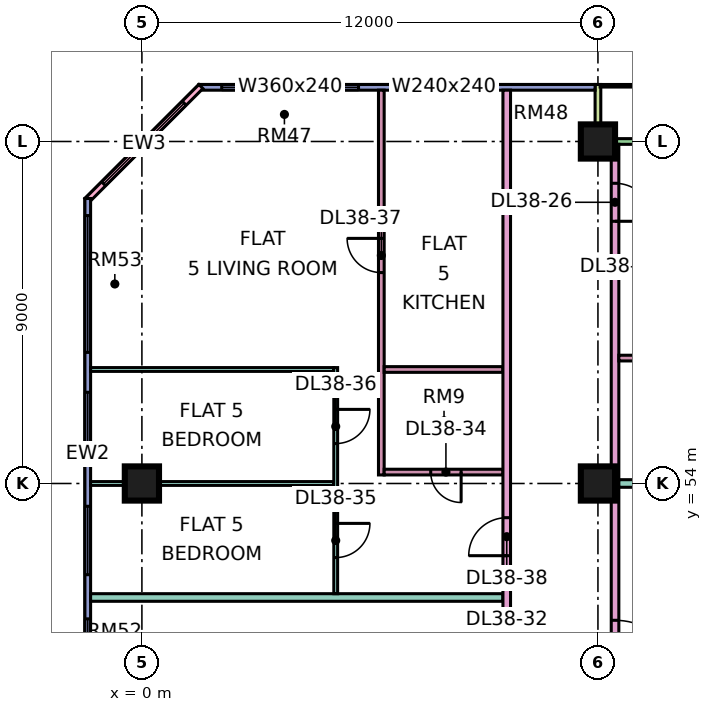
"""IFC4 building model, lengths in metres.
Left out: names, types, materials, properties, quantities, classifications, styles, units other than length and angle.
Written with IfcOpenShell. Run it as: python <this file> out.ifc"""

import sys

from ifc_helpers import new_model, si_unit, direction, frame, frame_2d, origin, origin_2d, place, context, subcontext, project, spatial, rectangle, extrude, element, fill, save


model = new_model("IFC4")
c1 = context("Model", 3, precision=1e-05, world=origin(), true_north=direction((0.0, 1.0)))
c2 = subcontext(c1, "Body", "Model", "MODEL_VIEW")
j1 = project(units=[si_unit("LENGTHUNIT", "METRE"), si_unit("PLANEANGLEUNIT", "RADIAN")], contexts=[c1])
p1 = place(None, origin())
s1 = spatial("IfcSite", under=j1, at=p1, CompositionType="ELEMENT")
p2 = place(p1, origin())
s2 = spatial("IfcBuilding", under=s1, at=p2, CompositionType="ELEMENT")
p3 = place(p2, frame((0.0, 0.0, 168.65)))
s3 = spatial("IfcBuildingStorey", under=s2, at=p3, CompositionType="ELEMENT", Elevation=168.65)
for number, where, z_axis, x_axis in (
    (1, (0.0, 54.0, 0.0), (0.0, 0.0, 1.0), (1.0, 0.0, 0.0)),
    (2, (12.0, 54.0, 0.0), (0.0, 0.0, 1.0), (1.0, 0.0, 0.0)),
    (3, (12.0, 63.0, 0.0), (0.0, 0.0, 1.0), (1.0, 0.0, 0.0)),
):
    element("IfcColumn", number, at=place(p3, frame(where, z_axis=z_axis, x_axis=x_axis)), inside=s3, PredefinedType="COLUMN", context=c2, shape_type="SweptSolid", body=[
        extrude(rectangle(XDim=0.9, YDim=0.9, at=origin_2d()), origin(), (0.0, 0.0, 1.0), 3.75),
    ])
p4 = place(p3, frame((22.425, 63.0, 0.0), z_axis=(0.0, 0.0, 1.0), x_axis=(-1.0, 0.0, 0.0)))
e4 = element("IfcWall", 4, at=p4, inside=s3, PredefinedType="SOLIDWALL", context=c2, shape_type="SweptSolid", body=[
    extrude(rectangle(XDim=10.35, YDim=0.15, at=frame_2d((5.175, 0.0))), origin(), (0.0, 0.0, 1.0), 3.35),
])
p5 = place(p4, frame((1.087, 0.0, 0.0)))
e5 = element("IfcOpeningElement", 5, at=p5, cuts=e4, PredefinedType="OPENING", context=c2, shape_type="SweptSolid", body=[
    extrude(rectangle(XDim=1.8, YDim=2.4, at=frame_2d((0.9, 1.2))), frame((0.0, 0.085, 0.0), z_axis=(0.0, -1.0, 0.0), x_axis=(1.0, 0.0, 0.0)), (0.0, 0.0, 1.0), 0.17),
])
p6 = place(p4, frame((5.425, 0.0, 0.45)))
e6 = element("IfcOpeningElement", 6, at=p6, cuts=e4, PredefinedType="OPENING", context=c2, shape_type="SweptSolid", body=[
    extrude(rectangle(XDim=3.0, YDim=2.4, at=frame_2d((1.5, 1.2))), frame((0.0, 0.085, 0.0), z_axis=(0.0, -1.0, 0.0), x_axis=(1.0, 0.0, 0.0)), (0.0, 0.0, 1.0), 0.17),
])
p7 = place(p3, frame((12.0, 64.5, 0.0), z_axis=(0.0, 0.0, 1.0), x_axis=(0.0, -1.0, 0.0)))
e7 = element("IfcWall", 7, at=p7, inside=s3, PredefinedType="SOLIDWALL", context=c2, shape_type="SweptSolid", body=[
    extrude(rectangle(XDim=1.5, YDim=0.15, at=frame_2d((0.75, 0.0))), origin(), (0.0, 0.0, 1.0), 3.35),
])
p8 = place(p3, frame((11.925, 64.425, 0.0), z_axis=(0.0, 0.0, 1.0), x_axis=(-1.0, 0.0, 0.0)))
e8 = element("IfcWall", 8, at=p8, inside=s3, PredefinedType="SOLIDWALL", context=c2, shape_type="SweptSolid", body=[
    extrude(rectangle(XDim=10.425, YDim=0.15, at=frame_2d((5.212, 0.0))), origin(), (0.0, 0.0, 1.0), 3.35),
])
p9 = place(p8, frame((2.775, 0.0, 0.45)))
e9 = element("IfcOpeningElement", 9, at=p9, cuts=e8, PredefinedType="OPENING", context=c2, shape_type="SweptSolid", body=[
    extrude(rectangle(XDim=2.4, YDim=2.4, at=frame_2d((1.2, 1.2))), frame((0.0, 0.085, 0.0), z_axis=(0.0, -1.0, 0.0), x_axis=(1.0, 0.0, 0.0)), (0.0, 0.0, 1.0), 0.17),
])
p10 = place(p8, frame((6.225, 0.0, 0.45)))
e10 = element("IfcOpeningElement", 10, at=p10, cuts=e8, PredefinedType="OPENING", context=c2, shape_type="SweptSolid", body=[
    extrude(rectangle(XDim=3.6, YDim=2.4, at=frame_2d((1.8, 1.2))), frame((0.0, 0.085, 0.0), z_axis=(0.0, -1.0, 0.0), x_axis=(1.0, 0.0, 0.0)), (0.0, 0.0, 1.0), 0.17),
])
p11 = place(p3, frame((1.553, 64.447, 0.0), z_axis=(0.0, 0.0, 1.0), x_axis=(-0.707106781187, -0.707106781187, 0.0)))
e11 = element("IfcWall", 11, at=p11, inside=s3, PredefinedType="SOLIDWALL", context=c2, shape_type="SweptSolid", body=[
    extrude(rectangle(XDim=4.243, YDim=0.15, at=frame_2d((2.121, 0.0))), origin(), (0.0, 0.0, 1.0), 3.35),
])
p12 = place(p11, frame((0.621, 0.0, 0.45)))
e12 = element("IfcOpeningElement", 12, at=p12, cuts=e11, PredefinedType="OPENING", context=c2, shape_type="SweptSolid", body=[
    extrude(rectangle(XDim=3.0, YDim=2.4, at=frame_2d((1.5, 1.2))), frame((0.0, 0.085, 0.0), z_axis=(0.0, -1.0, 0.0), x_axis=(1.0, 0.0, 0.0)), (0.0, 0.0, 1.0), 0.17),
])
p13 = place(p3, frame((-1.425, 61.5, 0.0), z_axis=(0.0, 0.0, 1.0), x_axis=(0.0, -1.0, 0.0)))
e13 = element("IfcWall", 13, at=p13, inside=s3, PredefinedType="SOLIDWALL", context=c2, shape_type="SweptSolid", body=[
    extrude(rectangle(XDim=13.425, YDim=0.15, at=frame_2d((6.712, 0.0))), origin(), (0.0, 0.0, 1.0), 3.35),
])
p14 = place(p13, frame((0.45, 0.0, 0.45)))
e14 = element("IfcOpeningElement", 14, at=p14, cuts=e13, PredefinedType="OPENING", context=c2, shape_type="SweptSolid", body=[
    extrude(rectangle(XDim=3.6, YDim=2.4, at=frame_2d((1.8, 1.2))), frame((0.0, 0.085, 0.0), z_axis=(0.0, -1.0, 0.0), x_axis=(1.0, 0.0, 0.0)), (0.0, 0.0, 1.0), 0.17),
])
p15 = place(p13, frame((5.1, 0.0, 0.45)))
e15 = element("IfcOpeningElement", 15, at=p15, cuts=e13, PredefinedType="OPENING", context=c2, shape_type="SweptSolid", body=[
    extrude(rectangle(XDim=1.8, YDim=2.4, at=frame_2d((0.9, 1.2))), frame((0.0, 0.085, 0.0), z_axis=(0.0, -1.0, 0.0), x_axis=(1.0, 0.0, 0.0)), (0.0, 0.0, 1.0), 0.17),
])
p16 = place(p13, frame((8.1, 0.0, 0.45)))
e16 = element("IfcOpeningElement", 16, at=p16, cuts=e13, PredefinedType="OPENING", context=c2, shape_type="SweptSolid", body=[
    extrude(rectangle(XDim=1.8, YDim=2.4, at=frame_2d((0.9, 1.2))), frame((0.0, 0.085, 0.0), z_axis=(0.0, -1.0, 0.0), x_axis=(1.0, 0.0, 0.0)), (0.0, 0.0, 1.0), 0.17),
])
p17 = place(p13, frame((11.062, 0.0, 0.45)))
e17 = element("IfcOpeningElement", 17, at=p17, cuts=e13, PredefinedType="OPENING", context=c2, shape_type="SweptSolid", body=[
    extrude(rectangle(XDim=1.8, YDim=2.4, at=frame_2d((0.9, 1.2))), frame((0.0, 0.085, 0.0), z_axis=(0.0, -1.0, 0.0), x_axis=(1.0, 0.0, 0.0)), (0.0, 0.0, 1.0), 0.17),
])
p18 = place(p3, frame((-1.351, 54.0, 0.0), z_axis=(0.0, 0.0, 1.0), x_axis=(1.0, 0.0, 0.0)))
e18 = element("IfcWall", 18, at=p18, inside=s3, PredefinedType="PARTITIONING", context=c2, shape_type="SweptSolid", body=[
    extrude(rectangle(XDim=6.401, YDim=0.1, at=frame_2d((3.201, 0.0))), origin(), (0.0, 0.0, 1.0), 3.35),
])
p19 = place(p3, frame((-1.35, 51.0, 0.0), z_axis=(0.0, 0.0, 1.0), x_axis=(1.0, 0.0, 0.0)))
e19 = element("IfcWall", 19, at=p19, inside=s3, PredefinedType="PARTITIONING", context=c2, shape_type="SweptSolid", body=[
    extrude(rectangle(XDim=10.85, YDim=0.2, at=frame_2d((5.425, 0.0))), origin(), (0.0, 0.0, 1.0), 3.35),
])
p20 = place(p3, frame((-1.35, 57.0, 0.0), z_axis=(0.0, 0.0, 1.0), x_axis=(1.0, 0.0, 0.0)))
e20 = element("IfcWall", 20, at=p20, inside=s3, PredefinedType="PARTITIONING", context=c2, shape_type="SweptSolid", body=[
    extrude(rectangle(XDim=6.4, YDim=0.1, at=frame_2d((3.2, 0.0))), origin(), (0.0, 0.0, 1.0), 3.35),
])
p21 = place(p3, frame((5.1, 51.1, 0.0), z_axis=(0.0, 0.0, 1.0), x_axis=(0.0, 1.0, 0.0)))
e21 = element("IfcWall", 21, at=p21, inside=s3, PredefinedType="PARTITIONING", context=c2, shape_type="SweptSolid", body=[
    extrude(rectangle(XDim=5.95, YDim=0.1, at=frame_2d((2.975, 0.0))), origin(), (0.0, 0.0, 1.0), 3.35),
])
p22 = place(p21, frame((0.95, 0.0, 0.0)))
e22 = element("IfcOpeningElement", 22, at=p22, cuts=e21, PredefinedType="OPENING", context=c2, shape_type="SweptSolid", body=[
    extrude(rectangle(XDim=0.9, YDim=2.1, at=frame_2d((0.45, 1.05))), frame((0.0, 0.06, 0.0), z_axis=(0.0, -1.0, 0.0), x_axis=(1.0, 0.0, 0.0)), (0.0, 0.0, 1.0), 0.12),
])
p23 = place(p21, frame((3.95, 0.0, 0.0)))
e23 = element("IfcOpeningElement", 23, at=p23, cuts=e21, PredefinedType="OPENING", context=c2, shape_type="SweptSolid", body=[
    extrude(rectangle(XDim=0.9, YDim=2.1, at=frame_2d((0.45, 1.05))), frame((0.0, 0.06, 0.0), z_axis=(0.0, -1.0, 0.0), x_axis=(1.0, 0.0, 0.0)), (0.0, 0.0, 1.0), 0.12),
])
p24 = place(p3, frame((6.3, 54.225, 0.0), z_axis=(0.0, 0.0, 1.0), x_axis=(0.0, 1.0, 0.0)))
e24 = element("IfcWall", 24, at=p24, inside=s3, PredefinedType="PARTITIONING", context=c2, shape_type="SweptSolid", body=[
    extrude(rectangle(XDim=10.125, YDim=0.15, at=frame_2d((5.062, 0.0))), origin(), (0.0, 0.0, 1.0), 3.35),
])
p25 = place(p24, frame((5.325, 0.0, 0.0)))
e25 = element("IfcOpeningElement", 25, at=p25, cuts=e24, PredefinedType="OPENING", context=c2, shape_type="SweptSolid", body=[
    extrude(rectangle(XDim=0.9, YDim=2.1, at=frame_2d((0.45, 1.05))), frame((0.0, 0.085, 0.0), z_axis=(0.0, -1.0, 0.0), x_axis=(1.0, 0.0, 0.0)), (0.0, 0.0, 1.0), 0.17),
])
p26 = place(p3, frame((6.375, 54.3, 0.0), z_axis=(0.0, 0.0, 1.0), x_axis=(1.0, 0.0, 0.0)))
e26 = element("IfcWall", 26, at=p26, inside=s3, PredefinedType="PARTITIONING", context=c2, shape_type="SweptSolid", body=[
    extrude(rectangle(XDim=3.125, YDim=0.15, at=frame_2d((1.562, 0.0))), origin(), (0.0, 0.0, 1.0), 3.35),
])
p27 = place(p26, frame((1.225, 0.0, 0.0)))
e27 = element("IfcOpeningElement", 27, at=p27, cuts=e26, PredefinedType="OPENING", context=c2, shape_type="SweptSolid", body=[
    extrude(rectangle(XDim=0.8, YDim=2.1, at=frame_2d((0.4, 1.05))), frame((0.0, 0.085, 0.0), z_axis=(0.0, -1.0, 0.0), x_axis=(1.0, 0.0, 0.0)), (0.0, 0.0, 1.0), 0.17),
])
p28 = place(p3, frame((6.375, 57.0, 0.0), z_axis=(0.0, 0.0, 1.0), x_axis=(1.0, 0.0, 0.0)))
e28 = element("IfcWall", 28, at=p28, inside=s3, PredefinedType="PARTITIONING", context=c2, shape_type="SweptSolid", body=[
    extrude(rectangle(XDim=3.125, YDim=0.15, at=frame_2d((1.562, 0.0))), origin(), (0.0, 0.0, 1.0), 3.35),
])
p29 = place(p3, frame((9.6, 20.0, 0.0), z_axis=(0.0, 0.0, 1.0), x_axis=(0.0, 1.0, 0.0)))
e29 = element("IfcWall", 29, at=p29, inside=s3, PredefinedType="PARTITIONING", context=c2, shape_type="SweptSolid", body=[
    extrude(rectangle(XDim=44.35, YDim=0.2, at=frame_2d((22.175, 0.0))), origin(), (0.0, 0.0, 1.0), 3.35),
])
p30 = place(p29, frame((28.8, 0.0, 0.0)))
e30 = element("IfcOpeningElement", 30, at=p30, cuts=e29, PredefinedType="OPENING", context=c2, shape_type="SweptSolid", body=[
    extrude(rectangle(XDim=1.0, YDim=2.1, at=frame_2d((0.5, 1.05))), frame((0.0, 0.11, 0.0), z_axis=(0.0, -1.0, 0.0), x_axis=(1.0, 0.0, 0.0)), (0.0, 0.0, 1.0), 0.22),
])
p31 = place(p29, frame((32.1, 0.0, 0.0)))
e31 = element("IfcOpeningElement", 31, at=p31, cuts=e29, PredefinedType="OPENING", context=c2, shape_type="SweptSolid", body=[
    extrude(rectangle(XDim=1.0, YDim=2.1, at=frame_2d((0.5, 1.05))), frame((0.0, 0.11, 0.0), z_axis=(0.0, -1.0, 0.0), x_axis=(1.0, 0.0, 0.0)), (0.0, 0.0, 1.0), 0.22),
])
p32 = place(p29, frame((0.6, 0.0, 0.0)))
e32 = element("IfcOpeningElement", 32, at=p32, cuts=e29, PredefinedType="OPENING", context=c2, shape_type="SweptSolid", body=[
    extrude(rectangle(XDim=1.2, YDim=2.1, at=frame_2d((0.6, 1.05))), frame((0.0, 0.11, 0.0), z_axis=(0.0, -1.0, 0.0), x_axis=(1.0, 0.0, 0.0)), (0.0, 0.0, 1.0), 0.22),
])
p33 = place(p29, frame((14.25, 0.0, 0.0)))
e33 = element("IfcOpeningElement", 33, at=p33, cuts=e29, PredefinedType="OPENING", context=c2, shape_type="SweptSolid", body=[
    extrude(rectangle(XDim=1.0, YDim=2.1, at=frame_2d((0.5, 1.05))), frame((0.0, 0.11, 0.0), z_axis=(0.0, -1.0, 0.0), x_axis=(1.0, 0.0, 0.0)), (0.0, 0.0, 1.0), 0.22),
])
p34 = place(p3, frame((12.45, 20.0, 0.0), z_axis=(0.0, 0.0, 1.0), x_axis=(0.0, 1.0, 0.0)))
e34 = element("IfcWall", 34, at=p34, inside=s3, PredefinedType="PARTITIONING", context=c2, shape_type="SweptSolid", body=[
    extrude(rectangle(XDim=42.926, YDim=0.2, at=frame_2d((21.463, 0.0))), origin(), (0.0, 0.0, 1.0), 3.35),
])
p35 = place(p34, frame((6.55, 0.0, 0.0)))
e35 = element("IfcOpeningElement", 35, at=p35, cuts=e34, PredefinedType="OPENING", context=c2, shape_type="SweptSolid", body=[
    extrude(rectangle(XDim=1.0, YDim=2.1, at=frame_2d((0.5, 1.05))), frame((0.0, 0.11, 0.0), z_axis=(0.0, -1.0, 0.0), x_axis=(1.0, 0.0, 0.0)), (0.0, 0.0, 1.0), 0.22),
])
p36 = place(p34, frame((12.25, 0.0, 0.0)))
e36 = element("IfcOpeningElement", 36, at=p36, cuts=e34, PredefinedType="OPENING", context=c2, shape_type="SweptSolid", body=[
    extrude(rectangle(XDim=1.6, YDim=2.1, at=frame_2d((0.8, 1.05))), frame((0.0, 0.11, 0.0), z_axis=(0.0, -1.0, 0.0), x_axis=(1.0, 0.0, 0.0)), (0.0, 0.0, 1.0), 0.22),
])
p37 = place(p34, frame((16.9, 0.0, 0.0)))
e37 = element("IfcOpeningElement", 37, at=p37, cuts=e34, PredefinedType="OPENING", context=c2, shape_type="SweptSolid", body=[
    extrude(rectangle(XDim=1.0, YDim=2.1, at=frame_2d((0.5, 1.05))), frame((0.0, 0.11, 0.0), z_axis=(0.0, -1.0, 0.0), x_axis=(1.0, 0.0, 0.0)), (0.0, 0.0, 1.0), 0.22),
])
p38 = place(p34, frame((40.9, 0.0, 0.0)))
e38 = element("IfcOpeningElement", 38, at=p38, cuts=e34, PredefinedType="OPENING", context=c2, shape_type="SweptSolid", body=[
    extrude(rectangle(XDim=1.0, YDim=2.1, at=frame_2d((0.5, 1.05))), frame((0.0, 0.11, 0.0), z_axis=(0.0, -1.0, 0.0), x_axis=(1.0, 0.0, 0.0)), (0.0, 0.0, 1.0), 0.22),
])
p39 = place(p34, frame((1.15, 0.0, 0.0)))
e39 = element("IfcOpeningElement", 39, at=p39, cuts=e34, PredefinedType="OPENING", context=c2, shape_type="SweptSolid", body=[
    extrude(rectangle(XDim=1.8, YDim=2.1, at=frame_2d((0.9, 1.05))), frame((0.0, 0.11, 0.0), z_axis=(0.0, -1.0, 0.0), x_axis=(1.0, 0.0, 0.0)), (0.0, 0.0, 1.0), 0.22),
])
p40 = place(p34, frame((28.6, 0.0, 0.0)))
e40 = element("IfcOpeningElement", 40, at=p40, cuts=e34, PredefinedType="OPENING", context=c2, shape_type="SweptSolid", body=[
    extrude(rectangle(XDim=1.8, YDim=2.1, at=frame_2d((0.9, 1.05))), frame((0.0, 0.11, 0.0), z_axis=(0.0, -1.0, 0.0), x_axis=(1.0, 0.0, 0.0)), (0.0, 0.0, 1.0), 0.22),
])
p41 = place(p3, frame((12.55, 54.0, 0.0), z_axis=(0.0, 0.0, 1.0), x_axis=(1.0, 0.0, 0.0)))
e41 = element("IfcWall", 41, at=p41, inside=s3, PredefinedType="PARTITIONING", context=c2, shape_type="SweptSolid", body=[
    extrude(rectangle(XDim=11.45, YDim=0.2, at=frame_2d((5.725, 0.0))), origin(), (0.0, 0.0, 1.0), 3.35),
])
p42 = place(p3, frame((12.55, 57.3, 0.0), z_axis=(0.0, 0.0, 1.0), x_axis=(1.0, 0.0, 0.0)))
e42 = element("IfcWall", 42, at=p42, inside=s3, PredefinedType="PARTITIONING", context=c2, shape_type="SweptSolid", body=[
    extrude(rectangle(XDim=4.625, YDim=0.15, at=frame_2d((2.312, 0.0))), origin(), (0.0, 0.0, 1.0), 3.35),
])
p43 = place(p3, frame((12.55, 59.7, 0.0), z_axis=(0.0, 0.0, 1.0), x_axis=(1.0, 0.0, 0.0)))
e43 = element("IfcWall", 43, at=p43, inside=s3, PredefinedType="PARTITIONING", context=c2, shape_type="SweptSolid", body=[
    extrude(rectangle(XDim=4.625, YDim=0.15, at=frame_2d((2.312, 0.0))), origin(), (0.0, 0.0, 1.0), 3.35),
])
p44 = place(p43, frame((1.85, 0.0, 0.0)))
e44 = element("IfcOpeningElement", 44, at=p44, cuts=e43, PredefinedType="OPENING", context=c2, shape_type="SweptSolid", body=[
    extrude(rectangle(XDim=0.8, YDim=2.1, at=frame_2d((0.4, 1.05))), frame((0.0, 0.085, 0.0), z_axis=(0.0, -1.0, 0.0), x_axis=(1.0, 0.0, 0.0)), (0.0, 0.0, 1.0), 0.17),
])
p45 = place(p9, origin())
e45 = element("IfcWindow", 45, at=p45, inside=s3, PartitioningType="SINGLE_PANEL", PredefinedType="WINDOW", context=c2, shape_type="SweptSolid", body=[
    extrude(rectangle(XDim=2.4, YDim=2.4, at=frame_2d((1.2, 1.2))), frame((0.0, 0.03, 0.0), z_axis=(0.0, -1.0, 0.0), x_axis=(1.0, 0.0, 0.0)), (0.0, 0.0, 1.0), 0.06),
])
fill(e9, e45)
p46 = place(p10, origin())
e46 = element("IfcWindow", 46, at=p46, inside=s3, PartitioningType="SINGLE_PANEL", PredefinedType="WINDOW", context=c2, shape_type="SweptSolid", body=[
    extrude(rectangle(XDim=3.6, YDim=2.4, at=frame_2d((1.8, 1.2))), frame((0.0, 0.03, 0.0), z_axis=(0.0, -1.0, 0.0), x_axis=(1.0, 0.0, 0.0)), (0.0, 0.0, 1.0), 0.06),
])
fill(e10, e46)
p47 = place(p12, origin())
e47 = element("IfcWindow", 47, at=p47, inside=s3, PartitioningType="SINGLE_PANEL", PredefinedType="WINDOW", context=c2, shape_type="SweptSolid", body=[
    extrude(rectangle(XDim=3.0, YDim=2.4, at=frame_2d((1.5, 1.2))), frame((0.0, 0.03, 0.0), z_axis=(0.0, -1.0, 0.0), x_axis=(1.0, 0.0, 0.0)), (0.0, 0.0, 1.0), 0.06),
])
fill(e12, e47)
p48 = place(p14, origin())
e48 = element("IfcWindow", 48, at=p48, inside=s3, PartitioningType="SINGLE_PANEL", PredefinedType="WINDOW", context=c2, shape_type="SweptSolid", body=[
    extrude(rectangle(XDim=3.6, YDim=2.4, at=frame_2d((1.8, 1.2))), frame((0.0, 0.03, 0.0), z_axis=(0.0, -1.0, 0.0), x_axis=(1.0, 0.0, 0.0)), (0.0, 0.0, 1.0), 0.06),
])
fill(e14, e48)
p49 = place(p15, origin())
e49 = element("IfcWindow", 49, at=p49, inside=s3, PartitioningType="SINGLE_PANEL", PredefinedType="WINDOW", context=c2, shape_type="SweptSolid", body=[
    extrude(rectangle(XDim=1.8, YDim=2.4, at=frame_2d((0.9, 1.2))), frame((0.0, 0.03, 0.0), z_axis=(0.0, -1.0, 0.0), x_axis=(1.0, 0.0, 0.0)), (0.0, 0.0, 1.0), 0.06),
])
fill(e15, e49)
p50 = place(p16, origin())
e50 = element("IfcWindow", 50, at=p50, inside=s3, PartitioningType="SINGLE_PANEL", PredefinedType="WINDOW", context=c2, shape_type="SweptSolid", body=[
    extrude(rectangle(XDim=1.8, YDim=2.4, at=frame_2d((0.9, 1.2))), frame((0.0, 0.03, 0.0), z_axis=(0.0, -1.0, 0.0), x_axis=(1.0, 0.0, 0.0)), (0.0, 0.0, 1.0), 0.06),
])
fill(e16, e50)
p51 = place(p17, origin())
e51 = element("IfcWindow", 51, at=p51, inside=s3, PartitioningType="SINGLE_PANEL", PredefinedType="WINDOW", context=c2, shape_type="SweptSolid", body=[
    extrude(rectangle(XDim=1.8, YDim=2.4, at=frame_2d((0.9, 1.2))), frame((0.0, 0.03, 0.0), z_axis=(0.0, -1.0, 0.0), x_axis=(1.0, 0.0, 0.0)), (0.0, 0.0, 1.0), 0.06),
])
fill(e17, e51)
p52 = place(p38, frame((1.0, 0.0, 0.0), z_axis=(0.0, 0.0, 1.0), x_axis=(-1.0, 0.0, 0.0)))
e52 = element("IfcDoor", 52, at=p52, inside=s3, OperationType="SINGLE_SWING_LEFT", PredefinedType="DOOR", context=c2, shape_type="SweptSolid", body=[
    extrude(rectangle(XDim=1.0, YDim=2.1, at=frame_2d((0.5, 1.05))), frame((0.0, 0.025, 0.0), z_axis=(0.0, -1.0, 0.0), x_axis=(1.0, 0.0, 0.0)), (0.0, 0.0, 1.0), 0.05),
])
fill(e38, e52)
p53 = place(p27, origin())
e53 = element("IfcDoor", 53, at=p53, inside=s3, OperationType="SINGLE_SWING_RIGHT", PredefinedType="DOOR", context=c2, shape_type="SweptSolid", body=[
    extrude(rectangle(XDim=0.8, YDim=2.1, at=frame_2d((0.4, 1.05))), frame((0.0, 0.025, 0.0), z_axis=(0.0, -1.0, 0.0), x_axis=(1.0, 0.0, 0.0)), (0.0, 0.0, 1.0), 0.05),
])
fill(e27, e53)
p54 = place(p22, origin())
e54 = element("IfcDoor", 54, at=p54, inside=s3, OperationType="SINGLE_SWING_RIGHT", PredefinedType="DOOR", context=c2, shape_type="SweptSolid", body=[
    extrude(rectangle(XDim=0.9, YDim=2.1, at=frame_2d((0.45, 1.05))), frame((0.0, 0.025, 0.0), z_axis=(0.0, -1.0, 0.0), x_axis=(1.0, 0.0, 0.0)), (0.0, 0.0, 1.0), 0.05),
])
fill(e22, e54)
p55 = place(p23, origin())
e55 = element("IfcDoor", 55, at=p55, inside=s3, OperationType="SINGLE_SWING_RIGHT", PredefinedType="DOOR", context=c2, shape_type="SweptSolid", body=[
    extrude(rectangle(XDim=0.9, YDim=2.1, at=frame_2d((0.45, 1.05))), frame((0.0, 0.025, 0.0), z_axis=(0.0, -1.0, 0.0), x_axis=(1.0, 0.0, 0.0)), (0.0, 0.0, 1.0), 0.05),
])
fill(e23, e55)
p56 = place(p25, frame((0.9, 0.0, 0.0), z_axis=(0.0, 0.0, 1.0), x_axis=(-1.0, 0.0, 0.0)))
e56 = element("IfcDoor", 56, at=p56, inside=s3, OperationType="SINGLE_SWING_RIGHT", PredefinedType="DOOR", context=c2, shape_type="SweptSolid", body=[
    extrude(rectangle(XDim=0.9, YDim=2.1, at=frame_2d((0.45, 1.05))), frame((0.0, 0.025, 0.0), z_axis=(0.0, -1.0, 0.0), x_axis=(1.0, 0.0, 0.0)), (0.0, 0.0, 1.0), 0.05),
])
fill(e25, e56)
p57 = place(p31, origin())
e57 = element("IfcDoor", 57, at=p57, inside=s3, OperationType="SINGLE_SWING_LEFT", PredefinedType="DOOR", context=c2, shape_type="SweptSolid", body=[
    extrude(rectangle(XDim=1.0, YDim=2.1, at=frame_2d((0.5, 1.05))), frame((0.0, 0.025, 0.0), z_axis=(0.0, -1.0, 0.0), x_axis=(1.0, 0.0, 0.0)), (0.0, 0.0, 1.0), 0.05),
])
fill(e31, e57)
p58 = place(p40, frame((1.8, 0.0, 0.0), z_axis=(0.0, 0.0, 1.0), x_axis=(-1.0, 0.0, 0.0)))
e58 = element("IfcDoor", 58, at=p58, inside=s3, OperationType="DOUBLE_DOOR_SINGLE_SWING", PredefinedType="DOOR", context=c2, shape_type="SweptSolid", body=[
    extrude(rectangle(XDim=1.8, YDim=2.1, at=frame_2d((0.9, 1.05))), frame((0.0, 0.025, 0.0), z_axis=(0.0, -1.0, 0.0), x_axis=(1.0, 0.0, 0.0)), (0.0, 0.0, 1.0), 0.05),
])
fill(e40, e58)
save(model, sys.argv[1])
